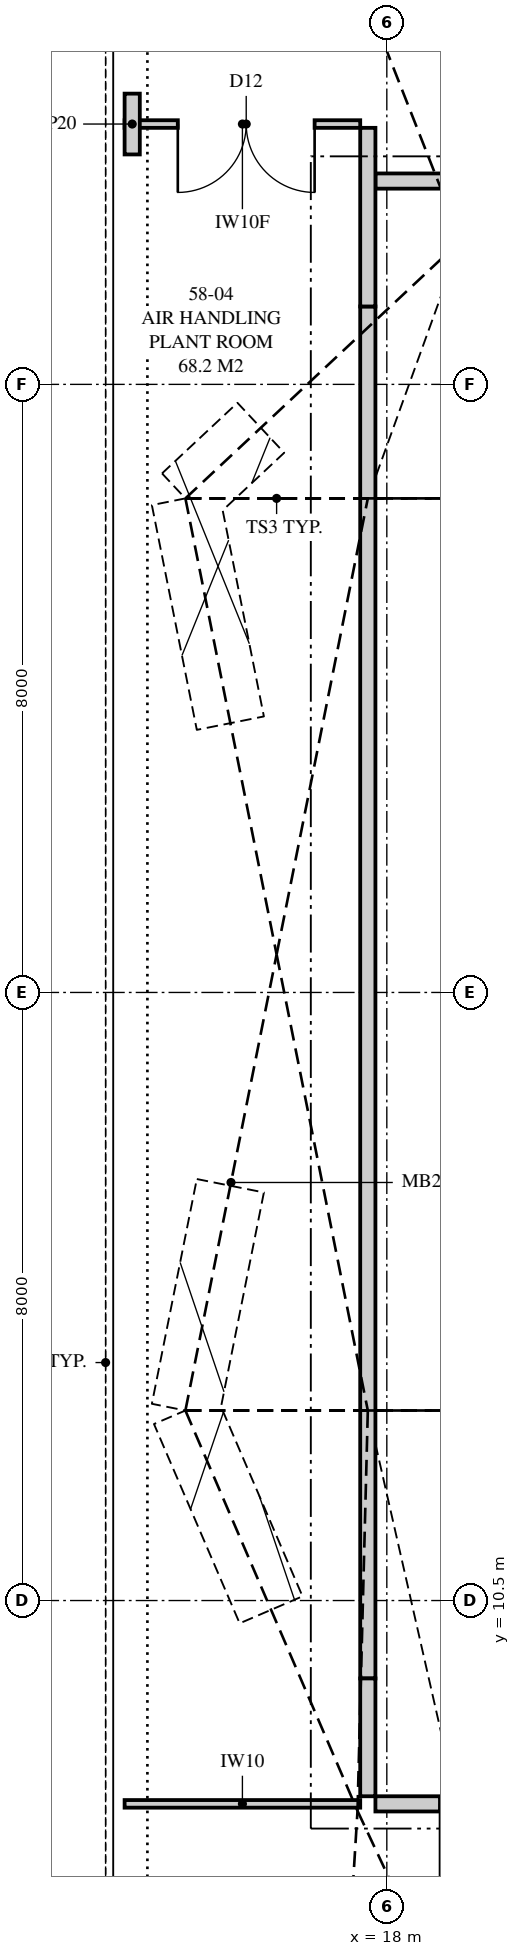
"""IFC4 building model, lengths in metres.
Left out: names, types, materials, properties, quantities, classifications, styles, units other than length and angle.
Written with IfcOpenShell. Run it as: python <this file> out.ifc"""

import sys

from ifc_helpers import new_model, si_unit, direction, frame, frame_2d, origin, origin_2d, place, context, subcontext, project, spatial, polyline, rectangle, hollow_rectangle, outline, extrude, element, fill, save


model = new_model("IFC4")
c1 = context("Model", 3, precision=1e-05, world=origin(), true_north=direction((0.0, 1.0)))
c2 = subcontext(c1, "Body", "Model", "MODEL_VIEW")
j1 = project(units=[si_unit("LENGTHUNIT", "METRE"), si_unit("PLANEANGLEUNIT", "RADIAN")], contexts=[c1])
p1 = place(None, origin())
s1 = spatial("IfcSite", under=j1, at=p1, CompositionType="ELEMENT")
p2 = place(p1, origin())
s2 = spatial("IfcBuilding", under=s1, at=p2, CompositionType="ELEMENT")
p3 = place(p2, frame((0.0, 0.0, 212.95)))
s3 = spatial("IfcBuildingStorey", under=s2, at=p3, CompositionType="ELEMENT", Elevation=212.95)
p4 = place(p3, frame((17.278, 32.722, 0.0), z_axis=(0.499107987003, -0.158326804345, 0.851952956645), x_axis=(0.536600054158, -0.715509962871, -0.447331951586)))
e1 = element("IfcColumn", 1, at=p4, inside=s3, PredefinedType="COLUMN", context=c2, shape_type="SweptSolid", body=[
    extrude(hollow_rectangle(XDim=1.6, YDim=1.6, WallThickness=0.125, at=origin_2d()), origin(), (0.0, 0.0, 1.0), 5.193),
])
p5 = place(p3, frame((17.85, 7.825, 0.0), z_axis=(0.0, 0.0, 1.0), x_axis=(1.0, 0.0, 0.0)))
e2 = element("IfcWall", 2, at=p5, inside=s3, PredefinedType="PARTITIONING", context=c2, shape_type="SweptSolid", body=[
    extrude(outline(polyline([(0.122, 1.271), (0.0, 1.25), (0.0, 0.0), (28.1, 0.0), (28.1, 4.72), (27.034, 4.72), (27.034, 4.141), (26.47, 4.141), (26.47, 4.72), (24.601, 4.72), (24.601, 4.141), (23.883, 4.141), (23.883, 4.72), (21.395, 4.72), (21.395, 4.141), (20.428, 4.141), (20.428, 4.72), (19.656, 4.72), (19.656, 4.245), (19.144, 4.245), (19.144, 4.72), (16.297, 4.72), (16.297, 4.141), (15.487, 4.141), (15.487, 4.72), (13.421, 4.72), (13.421, 4.141), (12.59, 4.141), (12.59, 4.72), (8.665, 4.72), (8.665, 4.141), (7.774, 4.141), (7.774, 4.72), (4.526, 4.72), (4.526, 4.141), (3.751, 4.141), (3.751, 4.72), (2.715, 4.72), (2.715, 3.52), (2.217, 3.52), (2.217, 3.5), (0.0, 3.5), (0.0, 2.283), (0.179, 2.283), (0.179, 2.258), (0.22, 2.258), (0.22, 1.377), (0.205, 1.363), (0.179, 1.334), (0.174, 1.292), (0.14, 1.291), (0.122, 1.271)]), holes=[polyline([(18.5, 3.316), (18.554, 3.43), (19.061, 3.496), (19.061, 3.004), (19.007, 2.889), (18.5, 2.824), (18.5, 3.316)])]), frame((0.0, 0.1, 0.0), z_axis=(0.0, -1.0, 0.0), x_axis=(1.0, 0.0, 0.0)), (0.0, 0.0, 1.0), 0.2),
])
p6 = place(p5, frame((0.85, 0.0, 0.0)))
e3 = element("IfcOpeningElement", 3, at=p6, cuts=e2, PredefinedType="OPENING", context=c2, shape_type="SweptSolid", body=[
    extrude(rectangle(XDim=1.0, YDim=2.1, at=frame_2d((0.5, 1.05))), frame((0.0, 0.11, 0.0), z_axis=(0.0, -1.0, 0.0), x_axis=(1.0, 0.0, 0.0)), (0.0, 0.0, 1.0), 0.22),
])
p7 = place(p5, frame((26.25, 0.0, 0.0)))
e4 = element("IfcOpeningElement", 4, at=p7, cuts=e2, PredefinedType="OPENING", context=c2, shape_type="SweptSolid", body=[
    extrude(rectangle(XDim=1.0, YDim=2.1, at=frame_2d((0.5, 1.05))), frame((0.0, 0.11, 0.0), z_axis=(0.0, -1.0, 0.0), x_axis=(1.0, 0.0, 0.0)), (0.0, 0.0, 1.0), 0.22),
])
p8 = place(p3, frame((17.75, 7.925, 0.0), z_axis=(0.0, 0.0, 1.0), x_axis=(0.0, 1.0, 0.0)))
e5 = element("IfcWall", 5, at=p8, inside=s3, PredefinedType="PARTITIONING", context=c2, shape_type="SweptSolid", body=[
    extrude(outline(polyline([(0.0, 0.0), (1.55, 0.0), (1.55, 1.362), (0.748, 1.362), (0.748, 0.918), (0.0, 0.918), (0.0, 0.0)])), frame((0.0, 0.1, 0.0), z_axis=(0.0, -1.0, 0.0), x_axis=(1.0, 0.0, 0.0)), (0.0, 0.0, 1.0), 0.2),
])
p9 = place(p3, frame((17.85, 29.175, 0.0), z_axis=(0.0, 0.0, 1.0), x_axis=(1.0, 0.0, 0.0)))
e6 = element("IfcWall", 6, at=p9, inside=s3, PredefinedType="PARTITIONING", context=c2, shape_type="SweptSolid", body=[
    extrude(outline(polyline([(0.23, 4.72), (0.0, 4.72), (0.0, 0.0), (28.1, 0.0), (28.1, 4.72), (27.445, 4.72), (27.445, 4.141), (26.822, 4.141), (26.822, 4.72), (25.369, 4.72), (25.369, 4.141), (24.469, 4.141), (24.469, 4.72), (23.874, 4.72), (23.874, 4.141), (22.984, 4.141), (22.984, 4.72), (19.656, 4.72), (19.656, 4.245), (19.144, 4.245), (19.144, 4.72), (16.332, 4.72), (16.332, 4.141), (15.518, 4.141), (15.518, 4.72), (15.386, 4.72), (15.386, 4.141), (14.344, 4.141), (14.344, 4.72), (5.839, 4.72), (5.839, 4.141), (4.593, 4.141), (4.593, 4.72), (2.754, 4.72), (2.754, 3.52), (2.591, 3.52), (2.591, 3.5), (1.302, 3.5), (1.302, 3.046), (1.221, 2.809), (0.343, 2.463), (0.343, 3.5), (0.23, 3.5), (0.23, 4.72)]), holes=[polyline([(18.387, 3.083), (18.903, 3.187), (18.903, 2.666), (18.835, 2.522), (18.319, 2.418), (18.319, 2.939), (18.387, 3.083)])]), frame((0.0, 0.1, 0.0), z_axis=(0.0, -1.0, 0.0), x_axis=(1.0, 0.0, 0.0)), (0.0, 0.0, 1.0), 0.2),
])
p10 = place(p9, frame((13.15, 0.0, 0.0)))
e7 = element("IfcOpeningElement", 7, at=p10, cuts=e6, PredefinedType="OPENING", context=c2, shape_type="SweptSolid", body=[
    extrude(rectangle(XDim=2.4, YDim=2.4, at=frame_2d((1.2, 1.2))), frame((0.0, 0.11, 0.0), z_axis=(0.0, -1.0, 0.0), x_axis=(1.0, 0.0, 0.0)), (0.0, 0.0, 1.0), 0.22),
])
p11 = place(p3, frame((17.75, 27.525, 0.0), z_axis=(0.0, 0.0, 1.0), x_axis=(0.0, 1.0, 0.0)))
e8 = element("IfcWall", 8, at=p11, inside=s3, PredefinedType="PARTITIONING", context=c2, shape_type="SweptSolid", body=[
    extrude(outline(polyline([(0.0, 0.0), (2.35, 0.0), (2.35, 4.72), (0.738, 4.72), (0.738, 3.5), (0.373, 3.5), (0.373, 2.501), (0.183, 2.221), (0.0, 2.096), (0.0, 0.0)])), frame((0.0, 0.1, 0.0), z_axis=(0.0, -1.0, 0.0), x_axis=(1.0, 0.0, 0.0)), (0.0, 0.0, 1.0), 0.2),
])
p12 = place(p3, frame((17.75, 9.475, 0.0), z_axis=(0.0, 0.0, 1.0), x_axis=(0.0, 1.0, 0.0)))
e9 = element("IfcWall", 9, at=p12, inside=s3, PredefinedType="PARTITIONING", context=c2, shape_type="SweptSolid", body=[
    extrude(outline(polyline([(2.815, 3.455), (0.0, 2.111), (0.0, 0.0), (18.05, 0.0), (18.05, 1.456), (17.12, 1.456), (17.12, 3.5), (16.235, 3.5), (16.235, 3.164), (14.815, 3.164), (14.815, 3.5), (14.778, 3.5), (12.975, 2.778), (12.975, 3.5), (6.075, 3.5), (6.075, 2.778), (4.271, 3.5), (4.235, 3.5), (4.235, 3.164), (2.815, 3.164), (2.815, 3.455)]), holes=[polyline([(3.303, 2.53), (3.747, 2.53), (3.747, 1.597), (3.303, 1.597), (3.303, 2.53)]), polyline([(15.303, 2.53), (15.747, 2.53), (15.747, 1.597), (15.303, 1.597), (15.303, 2.53)])]), frame((0.0, 0.1, 0.0), z_axis=(0.0, -1.0, 0.0), x_axis=(1.0, 0.0, 0.0)), (0.0, 0.0, 1.0), 0.2),
])
p13 = place(p3, frame((14.55, 7.825, 0.0), z_axis=(0.0, 0.0, 1.0), x_axis=(1.0, 0.0, 0.0)))
e10 = element("IfcWall", 10, at=p13, inside=s3, PredefinedType="PARTITIONING", context=c2, shape_type="SweptSolid", body=[
    extrude(outline(polyline([(0.0, 0.0), (3.1, 0.0), (3.1, 1.143), (2.558, 1.143), (2.558, 2.031), (2.606, 2.083), (2.656, 2.092), (2.656, 2.192), (2.658, 2.249), (3.1, 2.255), (3.1, 4.72), (0.0, 4.72), (0.0, 0.0)])), frame((0.0, 0.05, 0.0), z_axis=(0.0, -1.0, 0.0), x_axis=(1.0, 0.0, 0.0)), (0.0, 0.0, 1.0), 0.1),
])
p14 = place(p3, frame((14.55, 29.925, 0.0), z_axis=(0.0, 0.0, 1.0), x_axis=(1.0, 0.0, 0.0)))
e11 = element("IfcWall", 11, at=p14, inside=s3, PredefinedType="PARTITIONING", context=c2, shape_type="SweptSolid", body=[
    extrude(rectangle(XDim=3.1, YDim=0.1, at=frame_2d((1.55, 0.0))), origin(), (0.0, 0.0, 1.0), 4.72),
])
p15 = place(p14, frame((0.7, 0.0, 0.0)))
e12 = element("IfcOpeningElement", 12, at=p15, cuts=e11, PredefinedType="OPENING", context=c2, shape_type="SweptSolid", body=[
    extrude(rectangle(XDim=1.8, YDim=2.1, at=frame_2d((0.9, 1.05))), frame((0.0, 0.06, 0.0), z_axis=(0.0, -1.0, 0.0), x_axis=(1.0, 0.0, 0.0)), (0.0, 0.0, 1.0), 0.12),
])
p16 = place(p3, frame((14.65, 29.525, 0.0), z_axis=(0.0, 0.0, 1.0), x_axis=(0.0, 1.0, 0.0)))
e13 = element("IfcWall", 13, at=p16, inside=s3, PredefinedType="SOLIDWALL", context=c2, shape_type="SweptSolid", body=[
    extrude(rectangle(XDim=0.8, YDim=0.2, at=frame_2d((0.4, 0.0))), origin(), (0.0, 0.0, 1.0), 4.72),
])
p17 = place(p15, frame((1.8, 0.0, 0.0), z_axis=(0.0, 0.0, 1.0), x_axis=(-1.0, 0.0, 0.0)))
e14 = element("IfcDoor", 14, at=p17, inside=s3, OperationType="DOUBLE_DOOR_SINGLE_SWING", PredefinedType="DOOR", context=c2, shape_type="SweptSolid", body=[
    extrude(rectangle(XDim=1.8, YDim=2.1, at=frame_2d((0.9, 1.05))), frame((0.0, 0.025, 0.0), z_axis=(0.0, -1.0, 0.0), x_axis=(1.0, 0.0, 0.0)), (0.0, 0.0, 1.0), 0.05),
])
fill(e12, e14)
save(model, sys.argv[1])
